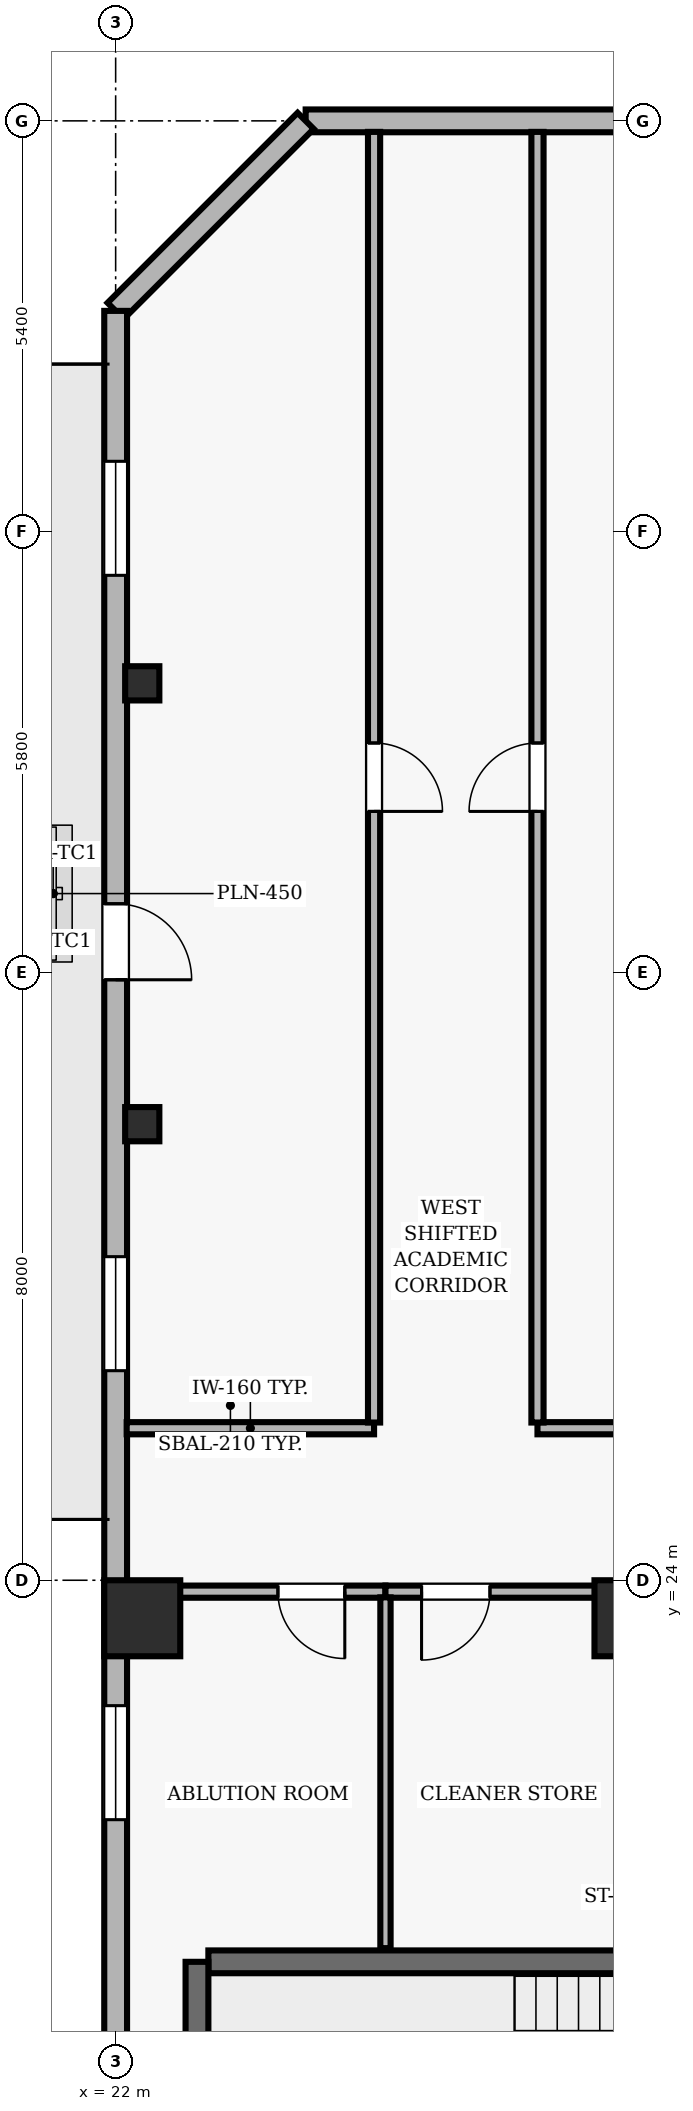
"""IFC4 building model, lengths in metres.
Left out: names, types, materials, properties, quantities, classifications, styles, units other than length and angle.
Written with IfcOpenShell. Run it as: python <this file> out.ifc"""

import sys

from ifc_helpers import new_model, si_unit, direction, frame, frame_2d, origin, origin_2d, place, context, subcontext, project, spatial, rectangle, hollow_rectangle, extrude, element, fill, save


model = new_model("IFC4")
c1 = context("Model", 3, precision=1e-05, world=origin(), true_north=direction((0.0, 1.0)))
c2 = subcontext(c1, "Body", "Model", "MODEL_VIEW")
j1 = project(units=[si_unit("LENGTHUNIT", "METRE"), si_unit("PLANEANGLEUNIT", "RADIAN")], contexts=[c1])
p1 = place(None, origin())
s1 = spatial("IfcSite", under=j1, at=p1, CompositionType="ELEMENT")
p2 = place(p1, origin())
s2 = spatial("IfcBuilding", under=s1, at=p2, CompositionType="ELEMENT")
p3 = place(p2, frame((0.0, 0.0, 218.7)))
s3 = spatial("IfcBuildingStorey", under=s2, at=p3, CompositionType="ELEMENT", Elevation=218.7)
for number, where, z_axis, x_axis in (
    (1, (22.35, 23.5, 0.0), (0.0, 0.0, 1.0), (1.0, 0.0, 0.0)),
    (2, (28.8, 23.5, 0.0), (0.0, 0.0, 1.0), (1.0, 0.0, 0.0)),
):
    element("IfcColumn", number, at=place(p3, frame(where, z_axis=z_axis, x_axis=x_axis)), inside=s3, PredefinedType="COLUMN", context=c2, shape_type="SweptSolid", body=[
        extrude(rectangle(XDim=1.0, YDim=1.0, at=origin_2d()), origin(), (0.0, 0.0, 1.0), 3.9),
    ])
for number, where, z_axis, x_axis in (
    (3, (22.35, 30.0, 0.0), (0.0, 0.0, 1.0), (1.0, 0.0, 0.0)),
    (4, (22.35, 35.8, 0.0), (0.0, 0.0, 1.0), (1.0, 0.0, 0.0)),
):
    element("IfcColumn", number, at=place(p3, frame(where, z_axis=z_axis, x_axis=x_axis)), inside=s3, PredefinedType="COLUMN", context=c2, shape_type="SweptSolid", body=[
        extrude(hollow_rectangle(XDim=0.45, YDim=0.45, WallThickness=0.02, at=origin_2d()), origin(), (0.0, 0.0, 1.0), 3.9),
    ])
p4 = place(p3, frame((35.5, 43.2, 0.0), z_axis=(0.0, 0.0, 1.0), x_axis=(-1.0, 0.0, 0.0)))
e5 = element("IfcWall", 5, at=p4, inside=s3, PredefinedType="SOLIDWALL", context=c2, shape_type="SweptSolid", body=[
    extrude(rectangle(XDim=11.0, YDim=0.3, at=frame_2d((5.5, 0.0))), origin(), (0.0, 0.0, 1.0), 3.69),
])
p5 = place(p4, frame((1.7, 0.0, 0.9)))
e6 = element("IfcOpeningElement", 6, at=p5, cuts=e5, PredefinedType="OPENING", context=c2, shape_type="SweptSolid", body=[
    extrude(rectangle(XDim=2.1, YDim=1.6, at=frame_2d((1.05, 0.8))), frame((0.0, 0.16, 0.0), z_axis=(0.0, -1.0, 0.0), x_axis=(1.0, 0.0, 0.0)), (0.0, 0.0, 1.0), 0.32),
])
p6 = place(p3, frame((24.5, 43.2, 0.0), z_axis=(0.0, 0.0, 1.0), x_axis=(-0.707106781187, -0.707106781187, 0.0)))
e7 = element("IfcWall", 7, at=p6, inside=s3, PredefinedType="SOLIDWALL", context=c2, shape_type="SweptSolid", body=[
    extrude(rectangle(XDim=3.536, YDim=0.3, at=frame_2d((1.768, 0.0))), origin(), (0.0, 0.0, 1.0), 3.69),
])
p7 = place(p3, frame((22.0, 40.7, 0.0), z_axis=(0.0, 0.0, 1.0), x_axis=(0.0, -1.0, 0.0)))
e8 = element("IfcWall", 8, at=p7, inside=s3, PredefinedType="SOLIDWALL", context=c2, shape_type="SweptSolid", body=[
    extrude(rectangle(XDim=38.2, YDim=0.3, at=frame_2d((19.1, 0.0))), origin(), (0.0, 0.0, 1.0), 3.69),
])
p8 = place(p7, frame((7.8, 0.0, 0.0)))
e9 = element("IfcOpeningElement", 9, at=p8, cuts=e8, PredefinedType="OPENING", context=c2, shape_type="SweptSolid", body=[
    extrude(rectangle(XDim=1.0, YDim=2.2, at=frame_2d((0.5, 1.1))), frame((0.0, 0.16, 0.0), z_axis=(0.0, -1.0, 0.0), x_axis=(1.0, 0.0, 0.0)), (0.0, 0.0, 1.0), 0.32),
])
p9 = place(p7, frame((1.979, 0.0, 0.9)))
e10 = element("IfcOpeningElement", 10, at=p9, cuts=e8, PredefinedType="OPENING", context=c2, shape_type="SweptSolid", body=[
    extrude(rectangle(XDim=1.5, YDim=1.8, at=frame_2d((0.75, 0.9))), frame((0.0, 0.16, 0.0), z_axis=(0.0, -1.0, 0.0), x_axis=(1.0, 0.0, 0.0)), (0.0, 0.0, 1.0), 0.32),
])
p10 = place(p7, frame((12.443, 0.0, 0.9)))
e11 = element("IfcOpeningElement", 11, at=p10, cuts=e8, PredefinedType="OPENING", context=c2, shape_type="SweptSolid", body=[
    extrude(rectangle(XDim=1.5, YDim=1.8, at=frame_2d((0.75, 0.9))), frame((0.0, 0.16, 0.0), z_axis=(0.0, -1.0, 0.0), x_axis=(1.0, 0.0, 0.0)), (0.0, 0.0, 1.0), 0.32),
])
p11 = place(p7, frame((18.35, 0.0, 0.9)))
e12 = element("IfcOpeningElement", 12, at=p11, cuts=e8, PredefinedType="OPENING", context=c2, shape_type="SweptSolid", body=[
    extrude(rectangle(XDim=1.5, YDim=1.8, at=frame_2d((0.75, 0.9))), frame((0.0, 0.16, 0.0), z_axis=(0.0, -1.0, 0.0), x_axis=(1.0, 0.0, 0.0)), (0.0, 0.0, 1.0), 0.32),
])
p12 = place(p7, frame((23.807, 0.0, 0.9)))
e13 = element("IfcOpeningElement", 13, at=p12, cuts=e8, PredefinedType="OPENING", context=c2, shape_type="SweptSolid", body=[
    extrude(rectangle(XDim=1.5, YDim=1.8, at=frame_2d((0.75, 0.9))), frame((0.0, 0.16, 0.0), z_axis=(0.0, -1.0, 0.0), x_axis=(1.0, 0.0, 0.0)), (0.0, 0.0, 1.0), 0.32),
])
p13 = place(p7, frame((29.264, 0.0, 0.9)))
e14 = element("IfcOpeningElement", 14, at=p13, cuts=e8, PredefinedType="OPENING", context=c2, shape_type="SweptSolid", body=[
    extrude(rectangle(XDim=1.5, YDim=1.8, at=frame_2d((0.75, 0.9))), frame((0.0, 0.16, 0.0), z_axis=(0.0, -1.0, 0.0), x_axis=(1.0, 0.0, 0.0)), (0.0, 0.0, 1.0), 0.32),
])
p14 = place(p3, frame((31.58, 18.98, 0.0), z_axis=(0.0, 0.0, 1.0), x_axis=(-1.0, 0.0, 0.0)))
e15 = element("IfcWall", 15, at=p14, inside=s3, PredefinedType="SHEAR", context=c2, shape_type="SweptSolid", body=[
    extrude(rectangle(XDim=8.36, YDim=0.3, at=frame_2d((4.18, 0.0))), origin(), (0.0, 0.0, 1.0), 3.69),
])
p15 = place(p3, frame((23.07, 18.98, 0.0), z_axis=(0.0, 0.0, 1.0), x_axis=(0.0, -1.0, 0.0)))
e16 = element("IfcWall", 16, at=p15, inside=s3, PredefinedType="SHEAR", context=c2, shape_type="SweptSolid", body=[
    extrude(rectangle(XDim=3.51, YDim=0.3, at=frame_2d((1.755, 0.0))), origin(), (0.0, 0.0, 1.0), 3.69),
])
p16 = place(p3, frame((25.4, 26.0, 0.0), z_axis=(0.0, 0.0, 1.0), x_axis=(-1.0, 0.0, 0.0)))
e17 = element("IfcWall", 17, at=p16, inside=s3, PredefinedType="PARTITIONING", context=c2, shape_type="SweptSolid", body=[
    extrude(rectangle(XDim=3.255, YDim=0.16, at=frame_2d((1.627, 0.0))), origin(), (0.0, 0.0, 1.0), 3.69),
])
p17 = place(p3, frame((25.55, 23.85, 0.0), z_axis=(0.0, 0.0, 1.0), x_axis=(-1.0, 0.0, 0.0)))
e18 = element("IfcWall", 18, at=p17, inside=s3, PredefinedType="PARTITIONING", context=c2, shape_type="SweptSolid", body=[
    extrude(rectangle(XDim=3.35, YDim=0.16, at=frame_2d((1.675, 0.0))), origin(), (0.0, 0.0, 1.0), 3.146),
])
p18 = place(p17, frame((0.535, 0.0, 0.0)))
e19 = element("IfcOpeningElement", 19, at=p18, cuts=e18, PredefinedType="OPENING", context=c2, shape_type="SweptSolid", body=[
    extrude(rectangle(XDim=0.88, YDim=2.1, at=frame_2d((0.44, 1.05))), frame((0.0, 0.09, 0.0), z_axis=(0.0, -1.0, 0.0), x_axis=(1.0, 0.0, 0.0)), (0.0, 0.0, 1.0), 0.18),
])
p19 = place(p3, frame((28.8, 23.85, 0.0), z_axis=(0.0, 0.0, 1.0), x_axis=(-1.0, 0.0, 0.0)))
e20 = element("IfcWall", 20, at=p19, inside=s3, PredefinedType="PARTITIONING", context=c2, shape_type="SweptSolid", body=[
    extrude(rectangle(XDim=3.25, YDim=0.16, at=frame_2d((1.625, 0.0))), origin(), (0.0, 0.0, 1.0), 3.146),
])
p20 = place(p19, frame((1.875, 0.0, 0.0)))
e21 = element("IfcOpeningElement", 21, at=p20, cuts=e20, PredefinedType="OPENING", context=c2, shape_type="SweptSolid", body=[
    extrude(rectangle(XDim=0.9, YDim=2.1, at=frame_2d((0.45, 1.05))), frame((0.0, 0.09, 0.0), z_axis=(0.0, -1.0, 0.0), x_axis=(1.0, 0.0, 0.0)), (0.0, 0.0, 1.0), 0.18),
])
p21 = place(p3, frame((37.85, 26.0, 0.0), z_axis=(0.0, 0.0, 1.0), x_axis=(-1.0, 0.0, 0.0)))
e22 = element("IfcWall", 22, at=p21, inside=s3, PredefinedType="PARTITIONING", context=c2, shape_type="SweptSolid", body=[
    extrude(rectangle(XDim=10.3, YDim=0.16, at=frame_2d((5.15, 0.0))), origin(), (0.0, 0.0, 1.0), 3.69),
])
p22 = place(p3, frame((25.4, 43.055, 0.0), z_axis=(0.0, 0.0, 1.0), x_axis=(0.0, -1.0, 0.0)))
e23 = element("IfcWall", 23, at=p22, inside=s3, PredefinedType="PARTITIONING", context=c2, shape_type="SweptSolid", body=[
    extrude(rectangle(XDim=16.98, YDim=0.16, at=frame_2d((8.49, 0.0))), origin(), (0.0, 0.0, 1.0), 3.69),
])
p23 = place(p22, frame((8.04, 0.0, 0.0)))
e24 = element("IfcOpeningElement", 24, at=p23, cuts=e23, PredefinedType="OPENING", context=c2, shape_type="SweptSolid", body=[
    extrude(rectangle(XDim=0.9, YDim=2.1, at=frame_2d((0.45, 1.05))), frame((0.0, 0.09, 0.0), z_axis=(0.0, -1.0, 0.0), x_axis=(1.0, 0.0, 0.0)), (0.0, 0.0, 1.0), 0.18),
])
p24 = place(p3, frame((25.55, 19.16, 0.0), z_axis=(0.0, 0.0, 1.0), x_axis=(0.0, 1.0, 0.0)))
e25 = element("IfcWall", 25, at=p24, inside=s3, PredefinedType="PARTITIONING", context=c2, shape_type="SweptSolid", body=[
    extrude(rectangle(XDim=4.615, YDim=0.135, at=frame_2d((2.308, 0.0))), origin(), (0.0, 0.0, 1.0), 3.69),
])
p25 = place(p3, frame((27.55, 26.075, 0.0), z_axis=(0.0, 0.0, 1.0), x_axis=(0.0, 1.0, 0.0)))
e26 = element("IfcWall", 26, at=p25, inside=s3, PredefinedType="PARTITIONING", context=c2, shape_type="SweptSolid", body=[
    extrude(rectangle(XDim=16.98, YDim=0.16, at=frame_2d((8.49, 0.0))), origin(), (0.0, 0.0, 1.0), 3.69),
])
p26 = place(p25, frame((8.04, 0.0, 0.0)))
e27 = element("IfcOpeningElement", 27, at=p26, cuts=e26, PredefinedType="OPENING", context=c2, shape_type="SweptSolid", body=[
    extrude(rectangle(XDim=0.9, YDim=2.1, at=frame_2d((0.45, 1.05))), frame((0.0, 0.09, 0.0), z_axis=(0.0, -1.0, 0.0), x_axis=(1.0, 0.0, 0.0)), (0.0, 0.0, 1.0), 0.18),
])
p27 = place(p8, origin())
e28 = element("IfcDoor", 28, at=p27, inside=s3, OperationType="SINGLE_SWING_RIGHT", PredefinedType="DOOR", context=c2, shape_type="SweptSolid", body=[
    extrude(rectangle(XDim=1.0, YDim=2.2, at=frame_2d((0.5, 1.1))), frame((0.0, 0.025, 0.0), z_axis=(0.0, -1.0, 0.0), x_axis=(1.0, 0.0, 0.0)), (0.0, 0.0, 1.0), 0.05),
])
fill(e9, e28)
p28 = place(p9, origin())
e29 = element("IfcWindow", 29, at=p28, inside=s3, PartitioningType="SINGLE_PANEL", PredefinedType="WINDOW", context=c2, shape_type="SweptSolid", body=[
    extrude(rectangle(XDim=1.5, YDim=1.8, at=frame_2d((0.75, 0.9))), frame((0.0, 0.03, 0.0), z_axis=(0.0, -1.0, 0.0), x_axis=(1.0, 0.0, 0.0)), (0.0, 0.0, 1.0), 0.06),
])
fill(e10, e29)
p29 = place(p10, origin())
e30 = element("IfcWindow", 30, at=p29, inside=s3, PartitioningType="SINGLE_PANEL", PredefinedType="WINDOW", context=c2, shape_type="SweptSolid", body=[
    extrude(rectangle(XDim=1.5, YDim=1.8, at=frame_2d((0.75, 0.9))), frame((0.0, 0.03, 0.0), z_axis=(0.0, -1.0, 0.0), x_axis=(1.0, 0.0, 0.0)), (0.0, 0.0, 1.0), 0.06),
])
fill(e11, e30)
p30 = place(p11, origin())
e31 = element("IfcWindow", 31, at=p30, inside=s3, PartitioningType="SINGLE_PANEL", PredefinedType="WINDOW", context=c2, shape_type="SweptSolid", body=[
    extrude(rectangle(XDim=1.5, YDim=1.8, at=frame_2d((0.75, 0.9))), frame((0.0, 0.03, 0.0), z_axis=(0.0, -1.0, 0.0), x_axis=(1.0, 0.0, 0.0)), (0.0, 0.0, 1.0), 0.06),
])
fill(e12, e31)
p31 = place(p18, origin())
e32 = element("IfcDoor", 32, at=p31, inside=s3, OperationType="SINGLE_SWING_LEFT", PredefinedType="DOOR", context=c2, shape_type="SweptSolid", body=[
    extrude(rectangle(XDim=0.88, YDim=2.1, at=frame_2d((0.44, 1.05))), frame((0.0, 0.025, 0.0), z_axis=(0.0, -1.0, 0.0), x_axis=(1.0, 0.0, 0.0)), (0.0, 0.0, 1.0), 0.05),
])
fill(e19, e32)
p32 = place(p20, origin())
e33 = element("IfcDoor", 33, at=p32, inside=s3, OperationType="SINGLE_SWING_RIGHT", PredefinedType="DOOR", context=c2, shape_type="SweptSolid", body=[
    extrude(rectangle(XDim=0.9, YDim=2.1, at=frame_2d((0.45, 1.05))), frame((0.0, 0.025, 0.0), z_axis=(0.0, -1.0, 0.0), x_axis=(1.0, 0.0, 0.0)), (0.0, 0.0, 1.0), 0.05),
])
fill(e21, e33)
p33 = place(p23, origin())
e34 = element("IfcDoor", 34, at=p33, inside=s3, OperationType="SINGLE_SWING_RIGHT", PredefinedType="DOOR", context=c2, shape_type="SweptSolid", body=[
    extrude(rectangle(XDim=0.9, YDim=2.1, at=frame_2d((0.45, 1.05))), frame((0.0, 0.025, 0.0), z_axis=(0.0, -1.0, 0.0), x_axis=(1.0, 0.0, 0.0)), (0.0, 0.0, 1.0), 0.05),
])
fill(e24, e34)
p34 = place(p26, origin())
e35 = element("IfcDoor", 35, at=p34, inside=s3, OperationType="SINGLE_SWING_LEFT", PredefinedType="DOOR", context=c2, shape_type="SweptSolid", body=[
    extrude(rectangle(XDim=0.9, YDim=2.1, at=frame_2d((0.45, 1.05))), frame((0.0, 0.025, 0.0), z_axis=(0.0, -1.0, 0.0), x_axis=(1.0, 0.0, 0.0)), (0.0, 0.0, 1.0), 0.05),
])
fill(e27, e35)
save(model, sys.argv[1])
